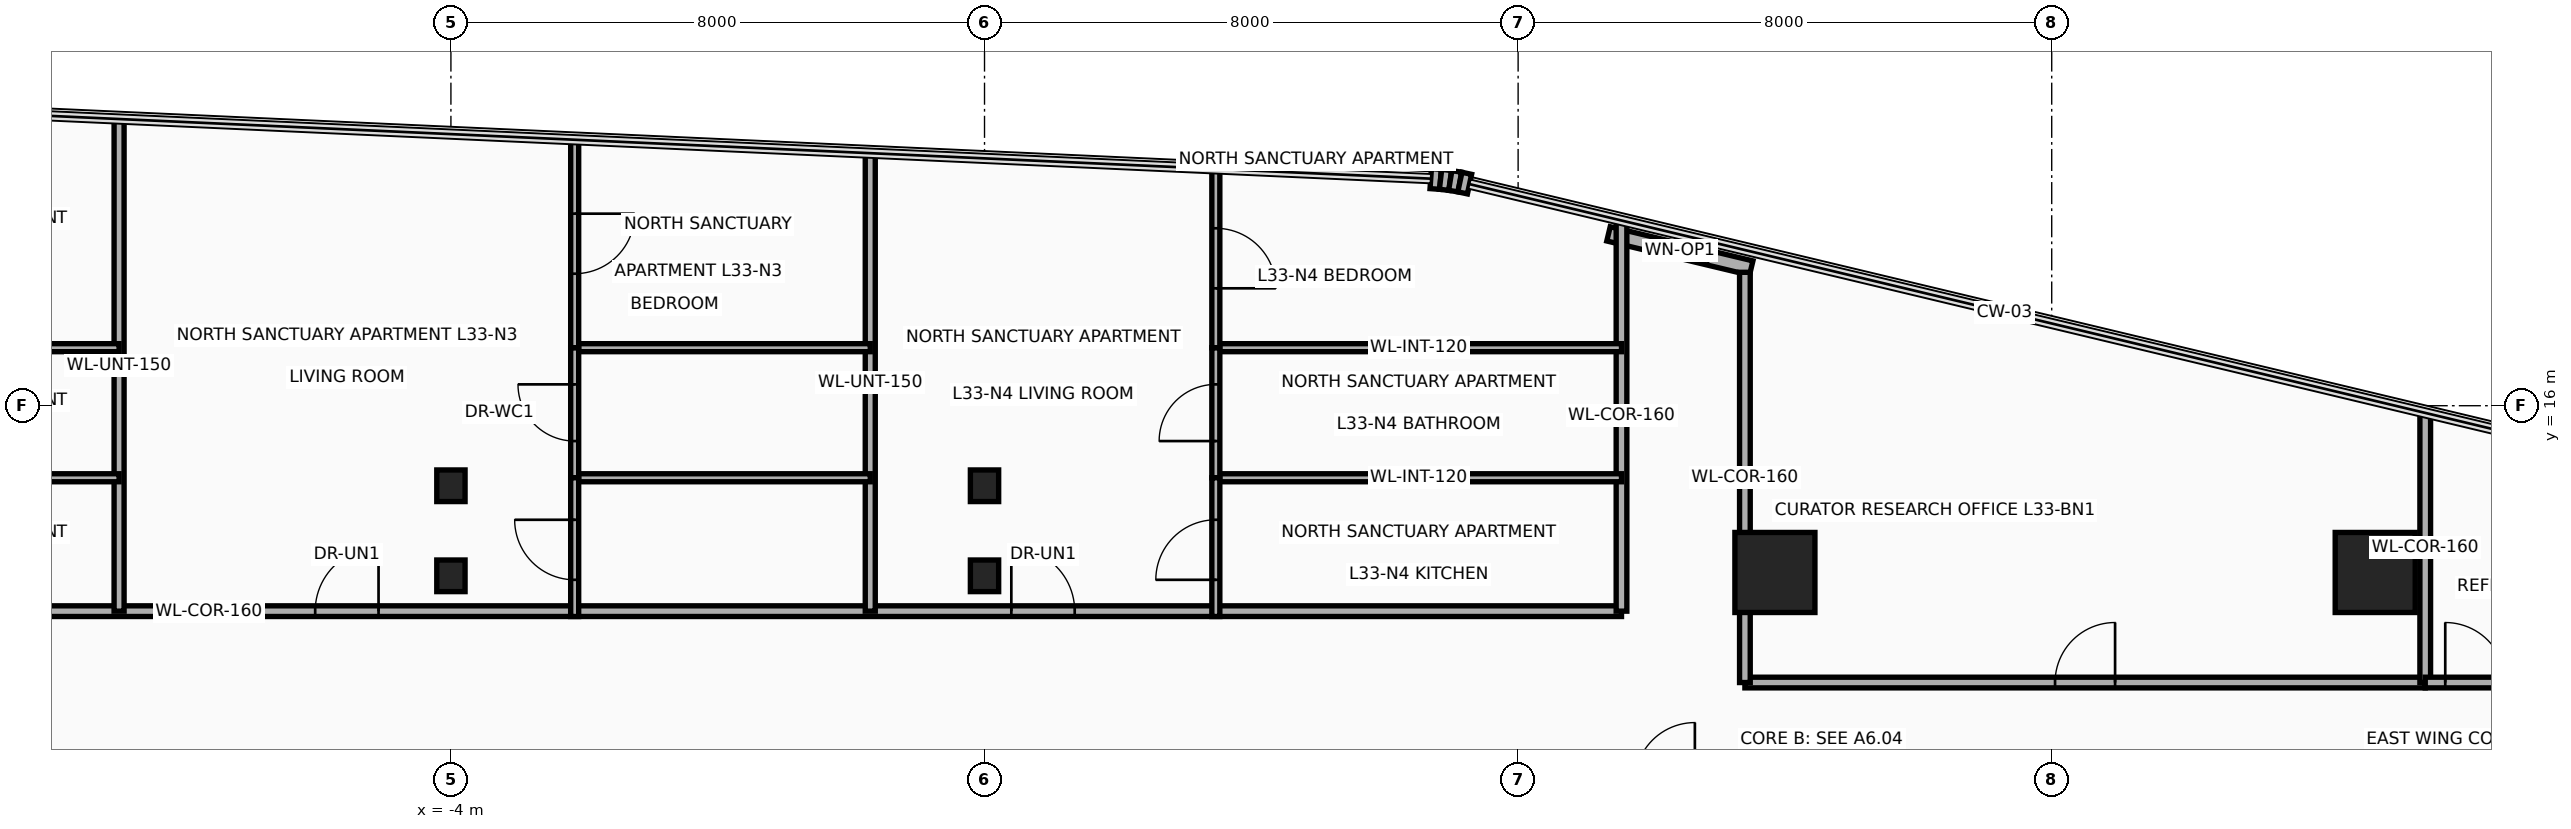
"""IFC4 building model, lengths in metres.
Left out: names, types, materials, properties, quantities, classifications, styles, units other than length and angle.
Written with IfcOpenShell. Run it as: python <this file> out.ifc"""

import sys

from ifc_helpers import new_model, si_unit, direction, frame, frame_2d, origin, origin_2d, place, context, subcontext, project, spatial, rectangle, i_section, extrude, source, transform, mapped, element, fill, save


model = new_model("IFC4")
c1 = context("Model", 3, precision=1e-05, world=origin(), true_north=direction((0.0, 1.0)))
c2 = subcontext(c1, "Body", "Model", "MODEL_VIEW")
j1 = project(units=[si_unit("LENGTHUNIT", "METRE"), si_unit("PLANEANGLEUNIT", "RADIAN")], contexts=[c1])
p1 = place(None, origin())
s1 = spatial("IfcSite", under=j1, at=p1, CompositionType="ELEMENT")
p2 = place(p1, origin())
s2 = spatial("IfcBuilding", under=s1, at=p2, CompositionType="ELEMENT")
p3 = place(p2, frame((0.0, 0.0, 131.6)))
s3 = spatial("IfcBuildingStorey", under=s2, at=p3, CompositionType="ELEMENT", Elevation=131.6)
m1 = source(origin(), c2, "Body", "SweptSolid", [
    extrude(rectangle(XDim=1.2, YDim=1.2, at=origin_2d()), origin(), (0.0, 0.0, 1.0), 3.7),
])
for number, where, z_axis, x_axis in (
    (1, (15.85, 13.5, 0.0), (0.0, 0.0, 1.0), (1.0, 0.0, 0.0)),
    (2, (24.85, 13.5, 0.0), (0.0, 0.0, 1.0), (1.0, 0.0, 0.0)),
):
    element("IfcColumn", number, at=place(p3, frame(where, z_axis=z_axis, x_axis=x_axis)), inside=s3, PredefinedType="COLUMN", context=c2, shape_type="MappedRepresentation", body=[
        mapped(m1, transform((0.0, 0.0, 0.0), x_axis=(1.0, 0.0, 0.0), y_axis=(0.0, 1.0, 0.0), z_axis=(0.0, 0.0, 1.0), scale=1.0)),
    ])
m2 = source(origin(), c2, "Body", "SweptSolid", [
    extrude(i_section(OverallWidth=0.424, OverallDepth=0.474, WebThickness=0.048, FlangeThickness=0.077, at=origin_2d()), origin(), (0.0, 0.0, 1.0), 3.7),
])
for number, where, z_axis, x_axis in (
    (3, (-4.0, 13.45, 0.0), (0.0, 0.0, 1.0), (1.0, 0.0, 0.0)),
    (4, (-4.0, 14.8, 0.0), (0.0, 0.0, 1.0), (1.0, 0.0, 0.0)),
    (5, (4.0, 13.45, 0.0), (0.0, 0.0, 1.0), (1.0, 0.0, 0.0)),
    (6, (4.0, 14.8, 0.0), (0.0, 0.0, 1.0), (1.0, 0.0, 0.0)),
):
    element("IfcColumn", number, at=place(p3, frame(where, z_axis=z_axis, x_axis=x_axis)), inside=s3, PredefinedType="COLUMN", context=c2, shape_type="MappedRepresentation", body=[
        mapped(m2, transform((0.0, 0.0, 0.0), x_axis=(1.0, 0.0, 0.0), y_axis=(0.0, 1.0, 0.0), z_axis=(0.0, 0.0, 1.0), scale=1.0)),
    ])
p4 = place(p3, frame((10.69, 19.404, 0.0), z_axis=(0.0, 0.0, 1.0), x_axis=(0.99758310784, -0.069483400546, 0.0)))
e7 = element("IfcWall", 7, at=p4, inside=s3, PredefinedType="SOLIDWALL", context=c2, shape_type="SweptSolid", body=[
    extrude(rectangle(XDim=0.147, YDim=0.3, at=frame_2d((0.074, 0.0))), origin(), (0.0, 0.0, 1.0), 3.46),
])
for number, where, z_axis, x_axis in (
    (8, (10.837, 19.394, 0.0), (0.0, 0.0, 1.0), (0.993, -0.117, 0.0)),
    (9, (10.983, 19.377, 0.0), (0.0, 0.0, 1.0), (0.987, -0.163, 0.0)),
):
    element("IfcWall", number, at=place(p3, frame(where, z_axis=z_axis, x_axis=x_axis)), inside=s3, PredefinedType="SOLIDWALL", context=c2, shape_type="SweptSolid", body=[
        extrude(rectangle(XDim=0.146, YDim=0.3, at=frame_2d((0.073, 0.0))), origin(), (0.0, 0.0, 1.0), 3.46),
    ])
p5 = place(p3, frame((11.127, 19.353, 0.0), z_axis=(0.0, 0.0, 1.0), x_axis=(0.978019841688, -0.208511844421, 0.0)))
e10 = element("IfcWall", 10, at=p5, inside=s3, PredefinedType="SOLIDWALL", context=c2, shape_type="SweptSolid", body=[
    extrude(rectangle(XDim=0.147, YDim=0.3, at=frame_2d((0.074, 0.0))), origin(), (0.0, 0.0, 1.0), 3.46),
])
p6 = place(p3, frame((13.355, 18.576, 0.0), z_axis=(0.0, 0.0, 1.0), x_axis=(0.97252211384, -0.232810519721, 0.0)))
e11 = element("IfcWall", 11, at=p6, inside=s3, PredefinedType="SOLIDWALL", context=c2, shape_type="SweptSolid", body=[
    extrude(rectangle(XDim=2.2, YDim=0.22, at=frame_2d((1.1, 0.0))), origin(), (0.0, 0.0, 1.0), 3.46),
])
p7 = place(p6, frame((0.65, 0.0, 0.95)))
e12 = element("IfcOpeningElement", 12, at=p7, cuts=e11, PredefinedType="OPENING", context=c2, shape_type="SweptSolid", body=[
    extrude(rectangle(XDim=0.9, YDim=1.3, at=frame_2d((0.45, 0.65))), frame((0.0, 0.125, 0.0), z_axis=(0.0, -1.0, 0.0), x_axis=(1.0, 0.0, 0.0)), (0.0, 0.0, 1.0), 0.25),
])
p8 = place(p3, frame((-28.25, 12.92, 0.0), z_axis=(0.0, 0.0, 1.0), x_axis=(1.0, 0.0, 0.0)))
e13 = element("IfcWall", 13, at=p8, inside=s3, PredefinedType="PARTITIONING", context=c2, shape_type="SweptSolid", body=[
    extrude(rectangle(XDim=41.8, YDim=0.16, at=frame_2d((20.9, 0.0))), origin(), (0.0, 0.0, 1.0), 2.666),
])
p9 = place(p8, frame((0.763, 0.0, 0.0)))
e14 = element("IfcOpeningElement", 14, at=p9, cuts=e13, PredefinedType="OPENING", context=c2, shape_type="SweptSolid", body=[
    extrude(rectangle(XDim=0.95, YDim=2.15, at=frame_2d((0.475, 1.075))), frame((0.0, 0.095, 0.0), z_axis=(0.0, -1.0, 0.0), x_axis=(1.0, 0.0, 0.0)), (0.0, 0.0, 1.0), 0.19),
])
p10 = place(p8, frame((10.696, 0.0, 0.0)))
e15 = element("IfcOpeningElement", 15, at=p10, cuts=e13, PredefinedType="OPENING", context=c2, shape_type="SweptSolid", body=[
    extrude(rectangle(XDim=0.95, YDim=2.15, at=frame_2d((0.475, 1.075))), frame((0.0, 0.095, 0.0), z_axis=(0.0, -1.0, 0.0), x_axis=(1.0, 0.0, 0.0)), (0.0, 0.0, 1.0), 0.19),
])
p11 = place(p8, frame((22.215, 0.0, 0.0)))
e16 = element("IfcOpeningElement", 16, at=p11, cuts=e13, PredefinedType="OPENING", context=c2, shape_type="SweptSolid", body=[
    extrude(rectangle(XDim=0.95, YDim=2.15, at=frame_2d((0.475, 1.075))), frame((0.0, 0.095, 0.0), z_axis=(0.0, -1.0, 0.0), x_axis=(1.0, 0.0, 0.0)), (0.0, 0.0, 1.0), 0.19),
])
p12 = place(p8, frame((32.652, 0.0, 0.0)))
e17 = element("IfcOpeningElement", 17, at=p12, cuts=e13, PredefinedType="OPENING", context=c2, shape_type="SweptSolid", body=[
    extrude(rectangle(XDim=0.95, YDim=2.15, at=frame_2d((0.475, 1.075))), frame((0.0, 0.095, 0.0), z_axis=(0.0, -1.0, 0.0), x_axis=(1.0, 0.0, 0.0)), (0.0, 0.0, 1.0), 0.19),
])
p13 = place(p3, frame((13.55, 12.92, 0.0), z_axis=(0.0, 0.0, 1.0), x_axis=(0.0, 1.0, 0.0)))
e18 = element("IfcWall", 18, at=p13, inside=s3, PredefinedType="PARTITIONING", context=c2, shape_type="SweptSolid", body=[
    extrude(rectangle(XDim=5.857, YDim=0.16, at=frame_2d((2.928, 0.0))), origin(), (0.0, 0.0, 1.0), 2.666),
])
p14 = place(p3, frame((-8.975, 12.92, 0.0), z_axis=(0.0, 0.0, 1.0), x_axis=(0.0, 1.0, 0.0)))
e19 = element("IfcWall", 19, at=p14, inside=s3, PredefinedType="PARTITIONING", context=c2, shape_type="SweptSolid", body=[
    extrude(rectangle(XDim=7.378, YDim=0.15, at=frame_2d((3.689, 0.0))), origin(), (0.0, 0.0, 1.0), 2.666),
])
p15 = place(p3, frame((2.287, 12.92, 0.0), z_axis=(0.0, 0.0, 1.0), x_axis=(0.0, 1.0, 0.0)))
e20 = element("IfcWall", 20, at=p15, inside=s3, PredefinedType="PARTITIONING", context=c2, shape_type="SweptSolid", body=[
    extrude(rectangle(XDim=6.866, YDim=0.15, at=frame_2d((3.433, 0.0))), origin(), (0.0, 0.0, 1.0), 2.666),
])
p16 = place(p3, frame((-14.658, 14.92, 0.0), z_axis=(0.0, 0.0, 1.0), x_axis=(1.0, 0.0, 0.0)))
e21 = element("IfcWall", 21, at=p16, inside=s3, PredefinedType="PARTITIONING", context=c2, shape_type="SweptSolid", body=[
    extrude(rectangle(XDim=5.683, YDim=0.12, at=frame_2d((2.842, 0.0))), origin(), (0.0, 0.0, 1.0), 2.666),
])
p17 = place(p3, frame((-14.658, 16.87, 0.0), z_axis=(0.0, 0.0, 1.0), x_axis=(1.0, 0.0, 0.0)))
e22 = element("IfcWall", 22, at=p17, inside=s3, PredefinedType="PARTITIONING", context=c2, shape_type="SweptSolid", body=[
    extrude(rectangle(XDim=5.683, YDim=0.12, at=frame_2d((2.842, 0.0))), origin(), (0.0, 0.0, 1.0), 3.46),
])
p18 = place(p3, frame((-2.145, 14.92, 0.0), z_axis=(0.0, 0.0, 1.0), x_axis=(1.0, 0.0, 0.0)))
e23 = element("IfcWall", 23, at=p18, inside=s3, PredefinedType="PARTITIONING", context=c2, shape_type="SweptSolid", body=[
    extrude(rectangle(XDim=4.432, YDim=0.12, at=frame_2d((2.216, 0.0))), origin(), (0.0, 0.0, 1.0), 2.666),
])
p19 = place(p3, frame((-2.145, 16.87, 0.0), z_axis=(0.0, 0.0, 1.0), x_axis=(1.0, 0.0, 0.0)))
e24 = element("IfcWall", 24, at=p19, inside=s3, PredefinedType="PARTITIONING", context=c2, shape_type="SweptSolid", body=[
    extrude(rectangle(XDim=4.432, YDim=0.12, at=frame_2d((2.216, 0.0))), origin(), (0.0, 0.0, 1.0), 3.46),
])
p20 = place(p3, frame((-2.145, 14.92, 0.0), z_axis=(0.0, 0.0, 1.0), x_axis=(0.0, 1.0, 0.0)))
e25 = element("IfcWall", 25, at=p20, inside=s3, PredefinedType="PARTITIONING", context=c2, shape_type="SweptSolid", body=[
    extrude(rectangle(XDim=1.95, YDim=0.12, at=frame_2d((0.975, 0.0))), origin(), (0.0, 0.0, 1.0), 2.666),
])
p21 = place(p20, frame((0.55, 0.0, 0.0)))
e26 = element("IfcOpeningElement", 26, at=p21, cuts=e25, PredefinedType="OPENING", context=c2, shape_type="SweptSolid", body=[
    extrude(rectangle(XDim=0.85, YDim=2.1, at=frame_2d((0.425, 1.05))), frame((0.0, 0.075, 0.0), z_axis=(0.0, -1.0, 0.0), x_axis=(1.0, 0.0, 0.0)), (0.0, 0.0, 1.0), 0.15),
])
p22 = place(p3, frame((-2.145, 12.84, 0.0), z_axis=(0.0, 0.0, 1.0), x_axis=(0.0, 1.0, 0.0)))
e27 = element("IfcWall", 27, at=p22, inside=s3, PredefinedType="PARTITIONING", context=c2, shape_type="SweptSolid", body=[
    extrude(rectangle(XDim=2.08, YDim=0.12, at=frame_2d((1.04, 0.0))), origin(), (0.0, 0.0, 1.0), 2.666),
])
p23 = place(p22, frame((0.55, 0.0, 0.0)))
e28 = element("IfcOpeningElement", 28, at=p23, cuts=e27, PredefinedType="OPENING", context=c2, shape_type="SweptSolid", body=[
    extrude(rectangle(XDim=0.9, YDim=2.1, at=frame_2d((0.45, 1.05))), frame((0.0, 0.075, 0.0), z_axis=(0.0, -1.0, 0.0), x_axis=(1.0, 0.0, 0.0)), (0.0, 0.0, 1.0), 0.15),
])
p24 = place(p3, frame((-2.145, 16.87, 0.0), z_axis=(0.0, 0.0, 1.0), x_axis=(0.0, 1.0, 0.0)))
e29 = element("IfcWall", 29, at=p24, inside=s3, PredefinedType="PARTITIONING", context=c2, shape_type="SweptSolid", body=[
    extrude(rectangle(XDim=3.117, YDim=0.12, at=frame_2d((1.559, 0.0))), origin(), (0.0, 0.0, 1.0), 3.46),
])
p25 = place(p24, frame((1.109, 0.0, 0.0)))
e30 = element("IfcOpeningElement", 30, at=p25, cuts=e29, PredefinedType="OPENING", context=c2, shape_type="SweptSolid", body=[
    extrude(rectangle(XDim=0.9, YDim=2.1, at=frame_2d((0.45, 1.05))), frame((0.0, 0.075, 0.0), z_axis=(0.0, -1.0, 0.0), x_axis=(1.0, 0.0, 0.0)), (0.0, 0.0, 1.0), 0.15),
])
for number, where, z_axis, x_axis in (
    (31, (7.468, 14.92, 0.0), (0.0, 0.0, 1.0), (1.0, 0.0, 0.0)),
    (32, (7.468, 16.87, 0.0), (0.0, 0.0, 1.0), (1.0, 0.0, 0.0)),
):
    element("IfcWall", number, at=place(p3, frame(where, z_axis=z_axis, x_axis=x_axis)), inside=s3, PredefinedType="PARTITIONING", context=c2, shape_type="SweptSolid", body=[
        extrude(rectangle(XDim=6.082, YDim=0.12, at=frame_2d((3.041, 0.0))), origin(), (0.0, 0.0, 1.0), 3.46),
    ])
p26 = place(p3, frame((7.468, 14.92, 0.0), z_axis=(0.0, 0.0, 1.0), x_axis=(0.0, 1.0, 0.0)))
e33 = element("IfcWall", 33, at=p26, inside=s3, PredefinedType="PARTITIONING", context=c2, shape_type="SweptSolid", body=[
    extrude(rectangle(XDim=1.95, YDim=0.12, at=frame_2d((0.975, 0.0))), origin(), (0.0, 0.0, 1.0), 3.46),
])
p27 = place(p26, frame((0.55, 0.0, 0.0)))
e34 = element("IfcOpeningElement", 34, at=p27, cuts=e33, PredefinedType="OPENING", context=c2, shape_type="SweptSolid", body=[
    extrude(rectangle(XDim=0.85, YDim=2.1, at=frame_2d((0.425, 1.05))), frame((0.0, 0.075, 0.0), z_axis=(0.0, -1.0, 0.0), x_axis=(1.0, 0.0, 0.0)), (0.0, 0.0, 1.0), 0.15),
])
p28 = place(p3, frame((7.468, 12.84, 0.0), z_axis=(0.0, 0.0, 1.0), x_axis=(0.0, 1.0, 0.0)))
e35 = element("IfcWall", 35, at=p28, inside=s3, PredefinedType="PARTITIONING", context=c2, shape_type="SweptSolid", body=[
    extrude(rectangle(XDim=2.08, YDim=0.12, at=frame_2d((1.04, 0.0))), origin(), (0.0, 0.0, 1.0), 2.666),
])
p29 = place(p28, frame((0.55, 0.0, 0.0)))
e36 = element("IfcOpeningElement", 36, at=p29, cuts=e35, PredefinedType="OPENING", context=c2, shape_type="SweptSolid", body=[
    extrude(rectangle(XDim=0.9, YDim=2.1, at=frame_2d((0.45, 1.05))), frame((0.0, 0.075, 0.0), z_axis=(0.0, -1.0, 0.0), x_axis=(1.0, 0.0, 0.0)), (0.0, 0.0, 1.0), 0.15),
])
p30 = place(p3, frame((7.468, 16.87, 0.0), z_axis=(0.0, 0.0, 1.0), x_axis=(0.0, 1.0, 0.0)))
e37 = element("IfcWall", 37, at=p30, inside=s3, PredefinedType="PARTITIONING", context=c2, shape_type="SweptSolid", body=[
    extrude(rectangle(XDim=2.68, YDim=0.12, at=frame_2d((1.34, 0.0))), origin(), (0.0, 0.0, 1.0), 3.46),
])
p31 = place(p30, frame((0.89, 0.0, 0.0)))
e38 = element("IfcOpeningElement", 38, at=p31, cuts=e37, PredefinedType="OPENING", context=c2, shape_type="SweptSolid", body=[
    extrude(rectangle(XDim=0.9, YDim=2.1, at=frame_2d((0.45, 1.05))), frame((0.0, 0.075, 0.0), z_axis=(0.0, -1.0, 0.0), x_axis=(1.0, 0.0, 0.0)), (0.0, 0.0, 1.0), 0.15),
])
p32 = place(p3, frame((15.4, 11.85, 0.0), z_axis=(0.0, 0.0, 1.0), x_axis=(1.0, 0.0, 0.0)))
e39 = element("IfcWall", 39, at=p32, inside=s3, PredefinedType="PARTITIONING", context=c2, shape_type="SweptSolid", body=[
    extrude(rectangle(XDim=10.2, YDim=0.16, at=frame_2d((5.1, 0.0))), origin(), (0.0, 0.0, 1.0), 2.834),
])
p33 = place(p32, frame((4.65, 0.0, 0.0)))
e40 = element("IfcOpeningElement", 40, at=p33, cuts=e39, PredefinedType="OPENING", context=c2, shape_type="SweptSolid", body=[
    extrude(rectangle(XDim=0.9, YDim=2.1, at=frame_2d((0.45, 1.05))), frame((0.0, 0.095, 0.0), z_axis=(0.0, -1.0, 0.0), x_axis=(1.0, 0.0, 0.0)), (0.0, 0.0, 1.0), 0.19),
])
p34 = place(p3, frame((15.4, 11.85, 0.0), z_axis=(0.0, 0.0, 1.0), x_axis=(0.0, 1.0, 0.0)))
e41 = element("IfcWall", 41, at=p34, inside=s3, PredefinedType="PARTITIONING", context=c2, shape_type="SweptSolid", body=[
    extrude(rectangle(XDim=6.15, YDim=0.16, at=frame_2d((3.075, 0.0))), origin(), (0.0, 0.0, 1.0), 2.666),
])
p35 = place(p3, frame((25.6, 11.85, 0.0), z_axis=(0.0, 0.0, 1.0), x_axis=(0.0, 1.0, 0.0)))
e42 = element("IfcWall", 42, at=p35, inside=s3, PredefinedType="PARTITIONING", context=c2, shape_type="SweptSolid", body=[
    extrude(rectangle(XDim=4.042, YDim=0.16, at=frame_2d((2.021, 0.0))), origin(), (0.0, 0.0, 1.0), 2.666),
])
p36 = place(p3, frame((25.6, 11.85, 0.0), z_axis=(0.0, 0.0, 1.0), x_axis=(1.0, 0.0, 0.0)))
e43 = element("IfcWall", 43, at=p36, inside=s3, PredefinedType="PARTITIONING", context=c2, shape_type="SweptSolid", body=[
    extrude(rectangle(XDim=4.09, YDim=0.16, at=frame_2d((2.045, 0.0))), origin(), (0.0, 0.0, 1.0), 2.896),
])
p37 = place(p36, frame((0.3, 0.0, 0.0)))
e44 = element("IfcOpeningElement", 44, at=p37, cuts=e43, PredefinedType="OPENING", context=c2, shape_type="SweptSolid", body=[
    extrude(rectangle(XDim=0.9, YDim=2.1, at=frame_2d((0.45, 1.05))), frame((0.0, 0.095, 0.0), z_axis=(0.0, -1.0, 0.0), x_axis=(1.0, 0.0, 0.0)), (0.0, 0.0, 1.0), 0.19),
])
p38 = place(p7, origin())
e45 = element("IfcWindow", 45, at=p38, inside=s3, PartitioningType="SINGLE_PANEL", PredefinedType="WINDOW", context=c2, shape_type="SweptSolid", body=[
    extrude(rectangle(XDim=0.9, YDim=1.3, at=frame_2d((0.45, 0.65))), frame((0.0, 0.03, 0.0), z_axis=(0.0, -1.0, 0.0), x_axis=(1.0, 0.0, 0.0)), (0.0, 0.0, 1.0), 0.06),
])
fill(e12, e45)
p39 = place(p11, origin())
e46 = element("IfcDoor", 46, at=p39, inside=s3, OperationType="SINGLE_SWING_RIGHT", PredefinedType="DOOR", context=c2, shape_type="SweptSolid", body=[
    extrude(rectangle(XDim=0.95, YDim=2.15, at=frame_2d((0.475, 1.075))), frame((0.0, 0.025, 0.0), z_axis=(0.0, -1.0, 0.0), x_axis=(1.0, 0.0, 0.0)), (0.0, 0.0, 1.0), 0.05),
])
fill(e16, e46)
p40 = place(p21, origin())
e47 = element("IfcDoor", 47, at=p40, inside=s3, OperationType="SINGLE_SWING_LEFT", PredefinedType="DOOR", context=c2, shape_type="SweptSolid", body=[
    extrude(rectangle(XDim=0.85, YDim=2.1, at=frame_2d((0.425, 1.05))), frame((0.0, 0.025, 0.0), z_axis=(0.0, -1.0, 0.0), x_axis=(1.0, 0.0, 0.0)), (0.0, 0.0, 1.0), 0.05),
])
fill(e26, e47)
p41 = place(p23, origin())
e48 = element("IfcDoor", 48, at=p41, inside=s3, OperationType="SINGLE_SWING_RIGHT", PredefinedType="DOOR", context=c2, shape_type="SweptSolid", body=[
    extrude(rectangle(XDim=0.9, YDim=2.1, at=frame_2d((0.45, 1.05))), frame((0.0, 0.025, 0.0), z_axis=(0.0, -1.0, 0.0), x_axis=(1.0, 0.0, 0.0)), (0.0, 0.0, 1.0), 0.05),
])
fill(e28, e48)
p42 = place(p25, frame((0.9, 0.0, 0.0), z_axis=(0.0, 0.0, 1.0), x_axis=(-1.0, 0.0, 0.0)))
e49 = element("IfcDoor", 49, at=p42, inside=s3, OperationType="SINGLE_SWING_LEFT", PredefinedType="DOOR", context=c2, shape_type="SweptSolid", body=[
    extrude(rectangle(XDim=0.9, YDim=2.1, at=frame_2d((0.45, 1.05))), frame((0.0, 0.025, 0.0), z_axis=(0.0, -1.0, 0.0), x_axis=(1.0, 0.0, 0.0)), (0.0, 0.0, 1.0), 0.05),
])
fill(e30, e49)
p43 = place(p12, origin())
e50 = element("IfcDoor", 50, at=p43, inside=s3, OperationType="SINGLE_SWING_RIGHT", PredefinedType="DOOR", context=c2, shape_type="SweptSolid", body=[
    extrude(rectangle(XDim=0.95, YDim=2.15, at=frame_2d((0.475, 1.075))), frame((0.0, 0.025, 0.0), z_axis=(0.0, -1.0, 0.0), x_axis=(1.0, 0.0, 0.0)), (0.0, 0.0, 1.0), 0.05),
])
fill(e17, e50)
p44 = place(p27, origin())
e51 = element("IfcDoor", 51, at=p44, inside=s3, OperationType="SINGLE_SWING_LEFT", PredefinedType="DOOR", context=c2, shape_type="SweptSolid", body=[
    extrude(rectangle(XDim=0.85, YDim=2.1, at=frame_2d((0.425, 1.05))), frame((0.0, 0.025, 0.0), z_axis=(0.0, -1.0, 0.0), x_axis=(1.0, 0.0, 0.0)), (0.0, 0.0, 1.0), 0.05),
])
fill(e34, e51)
p45 = place(p29, origin())
e52 = element("IfcDoor", 52, at=p45, inside=s3, OperationType="SINGLE_SWING_RIGHT", PredefinedType="DOOR", context=c2, shape_type="SweptSolid", body=[
    extrude(rectangle(XDim=0.9, YDim=2.1, at=frame_2d((0.45, 1.05))), frame((0.0, 0.025, 0.0), z_axis=(0.0, -1.0, 0.0), x_axis=(1.0, 0.0, 0.0)), (0.0, 0.0, 1.0), 0.05),
])
fill(e36, e52)
p46 = place(p31, frame((0.9, 0.0, 0.0), z_axis=(0.0, 0.0, 1.0), x_axis=(-1.0, 0.0, 0.0)))
e53 = element("IfcDoor", 53, at=p46, inside=s3, OperationType="SINGLE_SWING_LEFT", PredefinedType="DOOR", context=c2, shape_type="SweptSolid", body=[
    extrude(rectangle(XDim=0.9, YDim=2.1, at=frame_2d((0.45, 1.05))), frame((0.0, 0.025, 0.0), z_axis=(0.0, -1.0, 0.0), x_axis=(1.0, 0.0, 0.0)), (0.0, 0.0, 1.0), 0.05),
])
fill(e38, e53)
p47 = place(p33, origin())
e54 = element("IfcDoor", 54, at=p47, inside=s3, OperationType="SINGLE_SWING_RIGHT", PredefinedType="DOOR", context=c2, shape_type="SweptSolid", body=[
    extrude(rectangle(XDim=0.9, YDim=2.1, at=frame_2d((0.45, 1.05))), frame((0.0, 0.025, 0.0), z_axis=(0.0, -1.0, 0.0), x_axis=(1.0, 0.0, 0.0)), (0.0, 0.0, 1.0), 0.05),
])
fill(e40, e54)
p48 = place(p37, origin())
e55 = element("IfcDoor", 55, at=p48, inside=s3, OperationType="SINGLE_SWING_RIGHT", PredefinedType="DOOR", context=c2, shape_type="SweptSolid", body=[
    extrude(rectangle(XDim=0.9, YDim=2.1, at=frame_2d((0.45, 1.05))), frame((0.0, 0.025, 0.0), z_axis=(0.0, -1.0, 0.0), x_axis=(1.0, 0.0, 0.0)), (0.0, 0.0, 1.0), 0.05),
])
fill(e44, e55)
save(model, sys.argv[1])
